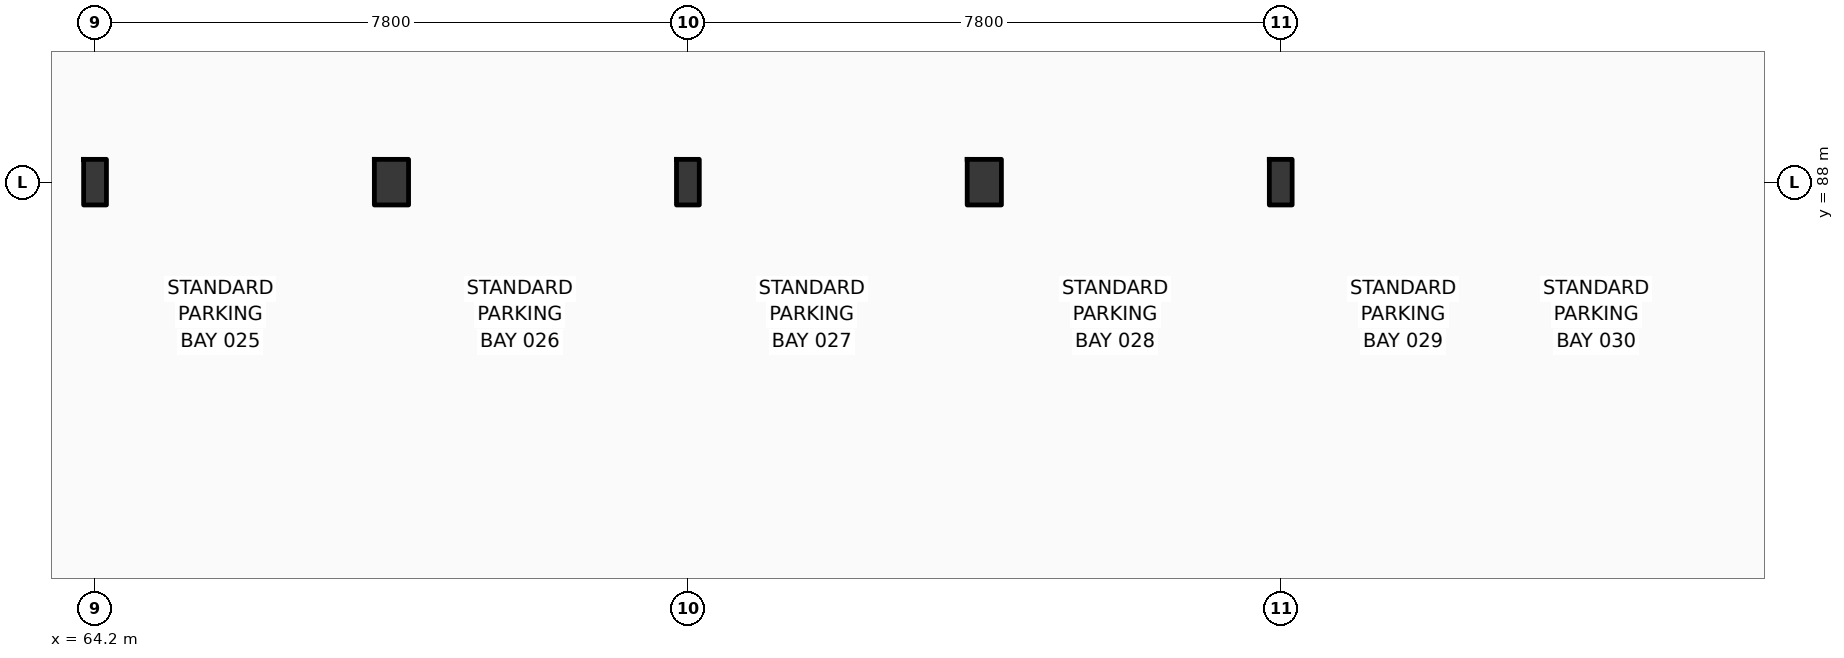
"""IFC4 building model, lengths in metres.
Left out: names, types, materials, properties, quantities, classifications, styles, units other than length and angle.
Written with IfcOpenShell. Run it as: python <this file> out.ifc"""

import sys

from ifc_helpers import new_model, si_unit, direction, frame, origin, origin_2d, place, context, subcontext, project, spatial, rectangle, i_section, extrude, element, save


model = new_model("IFC4")
c1 = context("Model", 3, precision=1e-05, world=origin(), true_north=direction((0.0, 1.0)))
c2 = subcontext(c1, "Body", "Model", "MODEL_VIEW")
j1 = project(units=[si_unit("LENGTHUNIT", "METRE"), si_unit("PLANEANGLEUNIT", "RADIAN")], contexts=[c1])
p1 = place(None, origin())
s1 = spatial("IfcSite", under=j1, at=p1, CompositionType="ELEMENT")
p2 = place(p1, origin())
s2 = spatial("IfcBuilding", under=s1, at=p2, CompositionType="ELEMENT")
p3 = place(p2, frame((0.0, 0.0, -4.5)))
s3 = spatial("IfcBuildingStorey", under=s2, at=p3, CompositionType="ELEMENT", Elevation=-4.5)
for number, where, z_axis, x_axis in (
    (1, (64.2, 88.0, 0.0), (0.0, 0.0, 1.0), (1.0, 0.0, 0.0)),
    (2, (72.0, 88.0, 0.0), (0.0, 0.0, 1.0), (1.0, 0.0, 0.0)),
    (3, (79.8, 88.0, 0.0), (0.0, 0.0, 1.0), (1.0, 0.0, 0.0)),
):
    element("IfcColumn", number, at=place(p3, frame(where, z_axis=z_axis, x_axis=x_axis)), inside=s3, PredefinedType="COLUMN", context=c2, shape_type="SweptSolid", body=[
        extrude(i_section(OverallWidth=0.3, OverallDepth=0.6, WebThickness=0.015, FlangeThickness=0.03, FilletRadius=0.027, at=origin_2d()), origin(), (0.0, 0.0, 1.0), 4.5),
    ])
for number, where, z_axis, x_axis in (
    (4, (68.1, 88.0, 0.0), (0.0, 0.0, 1.0), (1.0, 0.0, 0.0)),
    (5, (75.9, 88.0, 0.0), (0.0, 0.0, 1.0), (1.0, 0.0, 0.0)),
):
    element("IfcColumn", number, at=place(p3, frame(where, z_axis=z_axis, x_axis=x_axis)), inside=s3, PredefinedType="PILASTER", context=c2, shape_type="SweptSolid", body=[
        extrude(rectangle(XDim=0.45, YDim=0.6, at=origin_2d()), origin(), (0.0, 0.0, 1.0), 4.5),
    ])
save(model, sys.argv[1])
